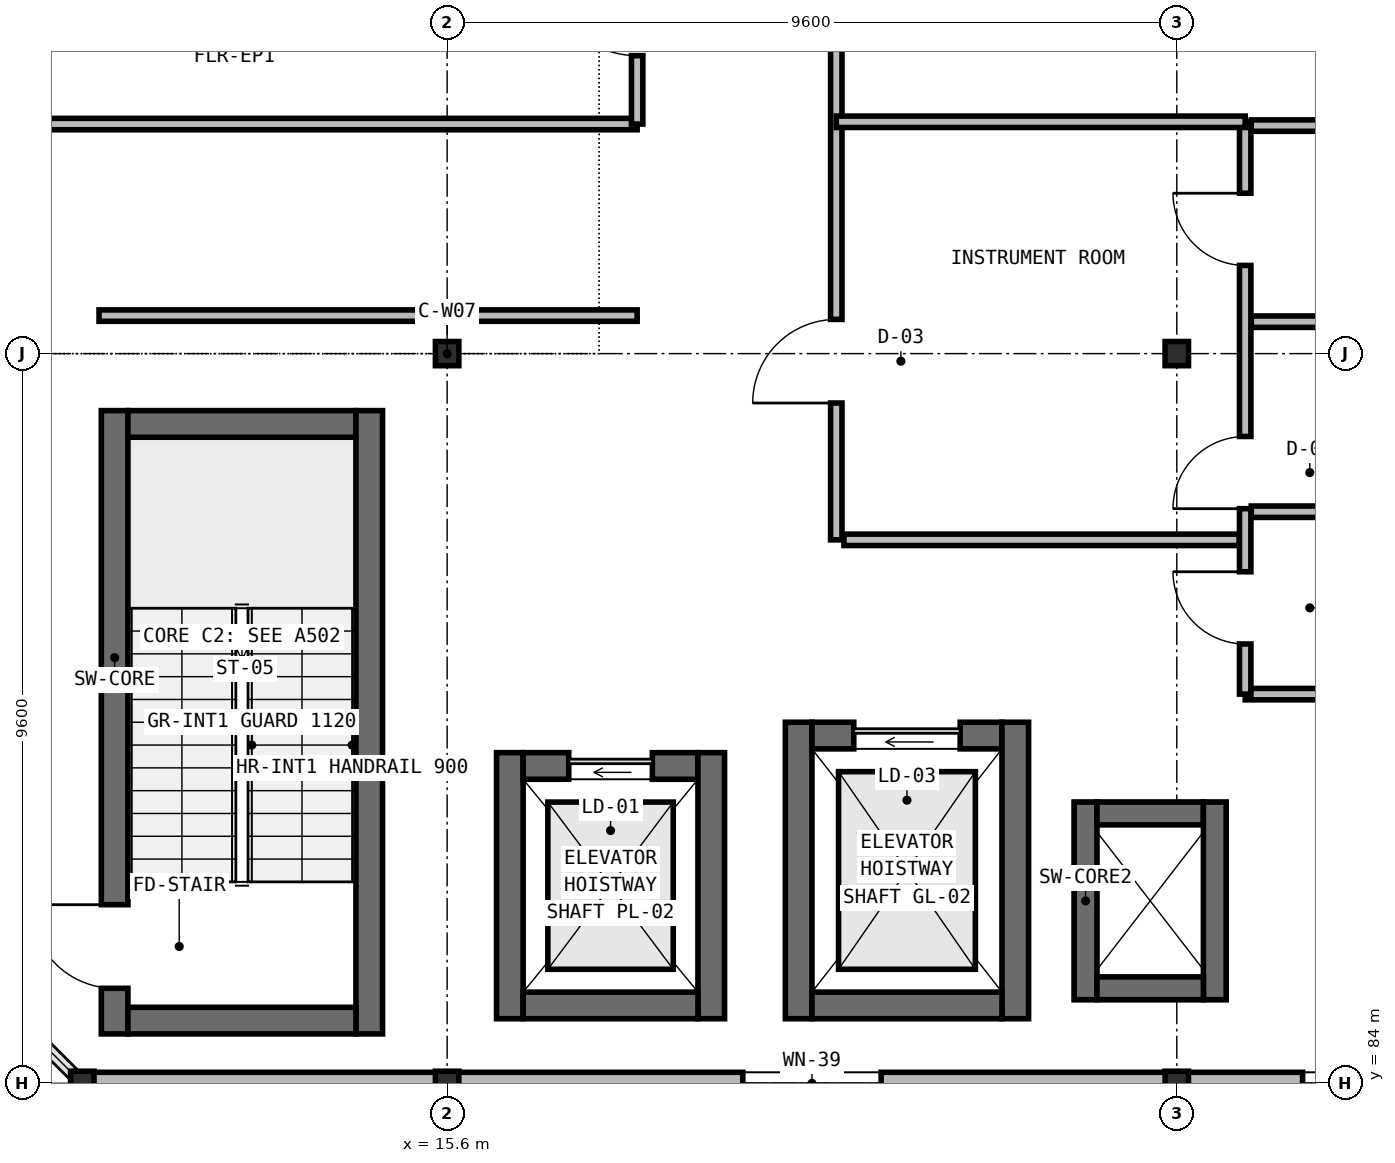
"""IFC4 building model, lengths in metres.
Left out: names, types, materials, properties, quantities, classifications, styles, units other than length and angle.
Written with IfcOpenShell. Run it as: python <this file> out.ifc"""

import sys

from ifc_helpers import new_model, si_unit, direction, frame, frame_2d, origin, origin_2d, place, context, subcontext, project, spatial, rectangle, i_section, extrude, element, fill, save


model = new_model("IFC4")
c1 = context("Model", 3, precision=1e-05, world=origin(), true_north=direction((0.0, 1.0)))
c2 = subcontext(c1, "Body", "Model", "MODEL_VIEW")
j1 = project(units=[si_unit("LENGTHUNIT", "METRE"), si_unit("PLANEANGLEUNIT", "RADIAN")], contexts=[c1])
p1 = place(None, origin())
s1 = spatial("IfcSite", under=j1, at=p1, CompositionType="ELEMENT")
p2 = place(p1, origin())
s2 = spatial("IfcBuilding", under=s1, at=p2, CompositionType="ELEMENT")
p3 = place(p2, frame((0.0, 0.0, 18.9)))
s3 = spatial("IfcBuildingStorey", under=s2, at=p3, CompositionType="ELEMENT", Elevation=18.9)
p4 = place(p3, frame((11.225, 84.65, 0.0), z_axis=(0.0, 0.0, 1.0), x_axis=(0.0, 1.0, 0.0)))
e1 = element("IfcWall", 1, at=p4, inside=s3, PredefinedType="SHEAR", context=c2, shape_type="SweptSolid", body=[
    extrude(rectangle(XDim=8.2, YDim=0.35, at=frame_2d((4.1, 0.0))), origin(), (0.0, 0.0, 1.0), 4.55),
])
p5 = place(p4, frame((0.6, 0.0, 0.0)))
e2 = element("IfcOpeningElement", 2, at=p5, cuts=e1, PredefinedType="OPENING", context=c2, shape_type="SweptSolid", body=[
    extrude(rectangle(XDim=1.1, YDim=2.15, at=frame_2d((0.55, 1.075))), frame((0.0, 0.185, 0.0), z_axis=(0.0, -1.0, 0.0), x_axis=(1.0, 0.0, 0.0)), (0.0, 0.0, 1.0), 0.37),
])
p6 = place(p3, frame((11.4, 92.675, 0.0), z_axis=(0.0, 0.0, 1.0), x_axis=(1.0, 0.0, 0.0)))
e3 = element("IfcWall", 3, at=p6, inside=s3, PredefinedType="SHEAR", context=c2, shape_type="SweptSolid", body=[
    extrude(rectangle(XDim=3.0, YDim=0.35, at=frame_2d((1.5, 0.0))), origin(), (0.0, 0.0, 1.0), 4.55),
])
p7 = place(p3, frame((14.575, 92.85, 0.0), z_axis=(0.0, 0.0, 1.0), x_axis=(0.0, -1.0, 0.0)))
e4 = element("IfcWall", 4, at=p7, inside=s3, PredefinedType="SHEAR", context=c2, shape_type="SweptSolid", body=[
    extrude(rectangle(XDim=8.2, YDim=0.35, at=frame_2d((4.1, 0.0))), origin(), (0.0, 0.0, 1.0), 4.55),
])
p8 = place(p3, frame((14.4, 84.825, 0.0), z_axis=(0.0, 0.0, 1.0), x_axis=(-1.0, 0.0, 0.0)))
e5 = element("IfcWall", 5, at=p8, inside=s3, PredefinedType="SHEAR", context=c2, shape_type="SweptSolid", body=[
    extrude(rectangle(XDim=3.0, YDim=0.35, at=frame_2d((1.5, 0.0))), origin(), (0.0, 0.0, 1.0), 4.55),
])
p9 = place(p3, frame((16.425, 84.85, 0.0), z_axis=(0.0, 0.0, 1.0), x_axis=(0.0, 1.0, 0.0)))
e6 = element("IfcWall", 6, at=p9, inside=s3, PredefinedType="SHEAR", context=c2, shape_type="SweptSolid", body=[
    extrude(rectangle(XDim=3.5, YDim=0.35, at=frame_2d((1.75, 0.0))), origin(), (0.0, 0.0, 1.0), 4.55),
])
p10 = place(p3, frame((16.6, 88.175, 0.0), z_axis=(0.0, 0.0, 1.0), x_axis=(1.0, 0.0, 0.0)))
e7 = element("IfcWall", 7, at=p10, inside=s3, PredefinedType="SHEAR", context=c2, shape_type="SweptSolid", body=[
    extrude(rectangle(XDim=2.3, YDim=0.35, at=frame_2d((1.15, 0.0))), origin(), (0.0, 0.0, 1.0), 4.55),
])
p11 = place(p10, frame((0.6, 0.0, 0.0)))
e8 = element("IfcOpeningElement", 8, at=p11, cuts=e7, PredefinedType="OPENING", context=c2, shape_type="SweptSolid", body=[
    extrude(rectangle(XDim=1.1, YDim=2.15, at=frame_2d((0.55, 1.075))), frame((0.0, 0.185, 0.0), z_axis=(0.0, -1.0, 0.0), x_axis=(1.0, 0.0, 0.0)), (0.0, 0.0, 1.0), 0.37),
])
p12 = place(p3, frame((19.075, 88.35, 0.0), z_axis=(0.0, 0.0, 1.0), x_axis=(0.0, -1.0, 0.0)))
e9 = element("IfcWall", 9, at=p12, inside=s3, PredefinedType="SHEAR", context=c2, shape_type="SweptSolid", body=[
    extrude(rectangle(XDim=3.5, YDim=0.35, at=frame_2d((1.75, 0.0))), origin(), (0.0, 0.0, 1.0), 4.55),
])
p13 = place(p3, frame((18.9, 85.025, 0.0), z_axis=(0.0, 0.0, 1.0), x_axis=(-1.0, 0.0, 0.0)))
e10 = element("IfcWall", 10, at=p13, inside=s3, PredefinedType="SHEAR", context=c2, shape_type="SweptSolid", body=[
    extrude(rectangle(XDim=2.3, YDim=0.35, at=frame_2d((1.15, 0.0))), origin(), (0.0, 0.0, 1.0), 4.55),
])
p14 = place(p3, frame((20.225, 84.85, 0.0), z_axis=(0.0, 0.0, 1.0), x_axis=(0.0, 1.0, 0.0)))
e11 = element("IfcWall", 11, at=p14, inside=s3, PredefinedType="SHEAR", context=c2, shape_type="SweptSolid", body=[
    extrude(rectangle(XDim=3.9, YDim=0.35, at=frame_2d((1.95, 0.0))), origin(), (0.0, 0.0, 1.0), 4.55),
])
p15 = place(p3, frame((20.4, 88.575, 0.0), z_axis=(0.0, 0.0, 1.0), x_axis=(1.0, 0.0, 0.0)))
e12 = element("IfcWall", 12, at=p15, inside=s3, PredefinedType="SHEAR", context=c2, shape_type="SweptSolid", body=[
    extrude(rectangle(XDim=2.5, YDim=0.35, at=frame_2d((1.25, 0.0))), origin(), (0.0, 0.0, 1.0), 4.55),
])
p16 = place(p15, frame((0.55, 0.0, 0.0)))
e13 = element("IfcOpeningElement", 13, at=p16, cuts=e12, PredefinedType="OPENING", context=c2, shape_type="SweptSolid", body=[
    extrude(rectangle(XDim=1.4, YDim=2.3, at=frame_2d((0.7, 1.15))), frame((0.0, 0.185, 0.0), z_axis=(0.0, -1.0, 0.0), x_axis=(1.0, 0.0, 0.0)), (0.0, 0.0, 1.0), 0.37),
])
p17 = place(p3, frame((23.075, 88.75, 0.0), z_axis=(0.0, 0.0, 1.0), x_axis=(0.0, -1.0, 0.0)))
e14 = element("IfcWall", 14, at=p17, inside=s3, PredefinedType="SHEAR", context=c2, shape_type="SweptSolid", body=[
    extrude(rectangle(XDim=3.9, YDim=0.35, at=frame_2d((1.95, 0.0))), origin(), (0.0, 0.0, 1.0), 4.55),
])
p18 = place(p3, frame((22.9, 85.025, 0.0), z_axis=(0.0, 0.0, 1.0), x_axis=(-1.0, 0.0, 0.0)))
e15 = element("IfcWall", 15, at=p18, inside=s3, PredefinedType="SHEAR", context=c2, shape_type="SweptSolid", body=[
    extrude(rectangle(XDim=2.5, YDim=0.35, at=frame_2d((1.25, 0.0))), origin(), (0.0, 0.0, 1.0), 4.55),
])
for number, where, z_axis, x_axis in (
    (16, (15.6, 84.0, 0.0), (0.0, 0.0, 1.0), (1.0, 0.0, 0.0)),
    (17, (15.6, 93.6, 0.0), (0.0, 0.0, 1.0), (1.0, 0.0, 0.0)),
    (18, (25.2, 84.0, 0.0), (0.0, 0.0, 1.0), (1.0, 0.0, 0.0)),
    (19, (25.2, 93.6, 0.0), (0.0, 0.0, 1.0), (1.0, 0.0, 0.0)),
    (20, (10.8, 84.0, 0.0), (0.0, 0.0, 1.0), (1.0, 0.0, 0.0)),
):
    element("IfcColumn", number, at=place(p3, frame(where, z_axis=z_axis, x_axis=x_axis)), inside=s3, PredefinedType="COLUMN", context=c2, shape_type="SweptSolid", body=[
        extrude(i_section(OverallWidth=0.308, OverallDepth=0.318, WebThickness=0.013, FlangeThickness=0.021, at=origin_2d()), origin(), (0.0, 0.0, 1.0), 4.55),
    ])
p19 = place(p3, frame((24.0, 85.1, 0.0), z_axis=(0.0, 0.0, 1.0), x_axis=(0.0, 1.0, 0.0)))
e21 = element("IfcWall", 21, at=p19, inside=s3, PredefinedType="SHEAR", context=c2, shape_type="SweptSolid", body=[
    extrude(rectangle(XDim=2.6, YDim=0.3, at=frame_2d((1.3, 0.0))), origin(), (0.0, 0.0, 1.0), 4.37),
])
p20 = place(p3, frame((24.15, 87.55, 0.0), z_axis=(0.0, 0.0, 1.0), x_axis=(1.0, 0.0, 0.0)))
e22 = element("IfcWall", 22, at=p20, inside=s3, PredefinedType="SHEAR", context=c2, shape_type="SweptSolid", body=[
    extrude(rectangle(XDim=1.4, YDim=0.3, at=frame_2d((0.7, 0.0))), origin(), (0.0, 0.0, 1.0), 4.37),
])
p21 = place(p3, frame((25.7, 87.7, 0.0), z_axis=(0.0, 0.0, 1.0), x_axis=(0.0, -1.0, 0.0)))
e23 = element("IfcWall", 23, at=p21, inside=s3, PredefinedType="SHEAR", context=c2, shape_type="SweptSolid", body=[
    extrude(rectangle(XDim=2.6, YDim=0.3, at=frame_2d((1.3, 0.0))), origin(), (0.0, 0.0, 1.0), 4.37),
])
p22 = place(p3, frame((25.55, 85.25, 0.0), z_axis=(0.0, 0.0, 1.0), x_axis=(-1.0, 0.0, 0.0)))
e24 = element("IfcWall", 24, at=p22, inside=s3, PredefinedType="SHEAR", context=c2, shape_type="SweptSolid", body=[
    extrude(rectangle(XDim=1.4, YDim=0.3, at=frame_2d((0.7, 0.0))), origin(), (0.0, 0.0, 1.0), 4.37),
])
p23 = place(p3, frame((29.996, 84.0, 0.0), z_axis=(0.0, 0.0, 1.0), x_axis=(-1.0, 0.0, 0.0)))
e25 = element("IfcWall", 25, at=p23, inside=s3, PredefinedType="SOLIDWALL", context=c2, shape_type="SweptSolid", body=[
    extrude(rectangle(XDim=4.792, YDim=0.29, at=frame_2d((2.396, 0.0))), origin(), (0.0, 0.0, 1.0), 4.37),
])
p24 = place(p23, frame((1.651, 0.0, 0.95)))
e26 = element("IfcOpeningElement", 26, at=p24, cuts=e25, PredefinedType="OPENING", context=c2, shape_type="SweptSolid", body=[
    extrude(rectangle(XDim=1.49, YDim=1.59, at=frame_2d((0.745, 0.795))), frame((0.0, 0.155, 0.0), z_axis=(0.0, -1.0, 0.0), x_axis=(1.0, 0.0, 0.0)), (0.0, 0.0, 1.0), 0.31),
])
p25 = place(p3, frame((25.196, 84.0, 0.0), z_axis=(0.0, 0.0, 1.0), x_axis=(-1.0, 0.0, 0.0)))
e27 = element("IfcWall", 27, at=p25, inside=s3, PredefinedType="SOLIDWALL", context=c2, shape_type="SweptSolid", body=[
    extrude(rectangle(XDim=9.592, YDim=0.29, at=frame_2d((4.796, 0.0))), origin(), (0.0, 0.0, 1.0), 3.884),
])
p26 = place(p25, frame((3.886, 0.0, 0.95)))
e28 = element("IfcOpeningElement", 28, at=p26, cuts=e27, PredefinedType="OPENING", context=c2, shape_type="SweptSolid", body=[
    extrude(rectangle(XDim=1.82, YDim=1.51, at=frame_2d((0.91, 0.755))), frame((0.0, 0.155, 0.0), z_axis=(0.0, -1.0, 0.0), x_axis=(1.0, 0.0, 0.0)), (0.0, 0.0, 1.0), 0.31),
])
p27 = place(p3, frame((15.596, 84.0, 0.0), z_axis=(0.0, 0.0, 1.0), x_axis=(-1.0, 0.0, 0.0)))
e29 = element("IfcWall", 29, at=p27, inside=s3, PredefinedType="SOLIDWALL", context=c2, shape_type="SweptSolid", body=[
    extrude(rectangle(XDim=4.792, YDim=0.29, at=frame_2d((2.396, 0.0))), origin(), (0.0, 0.0, 1.0), 4.37),
])
p28 = place(p3, frame((26.18, 91.52, 0.0), z_axis=(0.0, 0.0, 1.0), x_axis=(1.0, 0.0, 0.0)))
e30 = element("IfcWall", 30, at=p28, inside=s3, PredefinedType="PARTITIONING", context=c2, shape_type="SweptSolid", body=[
    extrude(rectangle(XDim=8.46, YDim=0.15, at=frame_2d((4.23, 0.0))), origin(), (0.0, 0.0, 1.0), 4.3),
])
for number, where, z_axis, x_axis in (
    (31, (26.18, 94.02, 0.0), (0.0, 0.0, 1.0), (1.0, 0.0, 0.0)),
    (32, (26.18, 96.6, 0.0), (0.0, 0.0, 1.0), (1.0, 0.0, 0.0)),
):
    element("IfcWall", number, at=place(p3, frame(where, z_axis=z_axis, x_axis=x_axis)), inside=s3, PredefinedType="PARTITIONING", context=c2, shape_type="SweptSolid", body=[
        extrude(rectangle(XDim=8.56, YDim=0.15, at=frame_2d((4.28, 0.0))), origin(), (0.0, 0.0, 1.0), 4.3),
    ])
p29 = place(p3, frame((26.1, 89.12, 0.0), z_axis=(0.0, 0.0, 1.0), x_axis=(1.0, 0.0, 0.0)))
e33 = element("IfcWall", 33, at=p29, inside=s3, PredefinedType="PARTITIONING", context=c2, shape_type="SweptSolid", body=[
    extrude(rectangle(XDim=8.54, YDim=0.15, at=frame_2d((4.27, 0.0))), origin(), (0.0, 0.0, 1.0), 4.3),
])
p30 = place(p3, frame((26.1, 89.12, 0.0), z_axis=(0.0, 0.0, 1.0), x_axis=(0.0, 1.0, 0.0)))
e34 = element("IfcWall", 34, at=p30, inside=s3, PredefinedType="PARTITIONING", context=c2, shape_type="SweptSolid", body=[
    extrude(rectangle(XDim=7.53, YDim=0.15, at=frame_2d((3.765, 0.0))), origin(), (0.0, 0.0, 1.0), 4.3),
])
p31 = place(p30, frame((0.66, 0.0, 0.0)))
e35 = element("IfcOpeningElement", 35, at=p31, cuts=e34, PredefinedType="OPENING", context=c2, shape_type="SweptSolid", body=[
    extrude(rectangle(XDim=0.95, YDim=2.1, at=frame_2d((0.475, 1.05))), frame((0.0, 0.085, 0.0), z_axis=(0.0, -1.0, 0.0), x_axis=(1.0, 0.0, 0.0)), (0.0, 0.0, 1.0), 0.17),
])
p32 = place(p30, frame((2.44, 0.0, 0.0)))
e36 = element("IfcOpeningElement", 36, at=p32, cuts=e34, PredefinedType="OPENING", context=c2, shape_type="SweptSolid", body=[
    extrude(rectangle(XDim=0.95, YDim=2.1, at=frame_2d((0.475, 1.05))), frame((0.0, 0.085, 0.0), z_axis=(0.0, -1.0, 0.0), x_axis=(1.0, 0.0, 0.0)), (0.0, 0.0, 1.0), 0.17),
])
p33 = place(p30, frame((5.64, 0.0, 0.0)))
e37 = element("IfcOpeningElement", 37, at=p33, cuts=e34, PredefinedType="OPENING", context=c2, shape_type="SweptSolid", body=[
    extrude(rectangle(XDim=0.95, YDim=2.1, at=frame_2d((0.475, 1.05))), frame((0.0, 0.085, 0.0), z_axis=(0.0, -1.0, 0.0), x_axis=(1.0, 0.0, 0.0)), (0.0, 0.0, 1.0), 0.17),
])
p34 = place(p3, frame((6.16, 96.62, 0.0), z_axis=(0.0, 0.0, 1.0), x_axis=(1.0, 0.0, 0.0)))
e38 = element("IfcWall", 38, at=p34, inside=s3, PredefinedType="PARTITIONING", context=c2, shape_type="SweptSolid", body=[
    extrude(rectangle(XDim=11.94, YDim=0.15, at=frame_2d((5.97, 0.0))), origin(), (0.0, 0.0, 1.0), 4.3),
])
p35 = place(p3, frame((11.02, 94.1, 0.0), z_axis=(0.0, 0.0, 1.0), x_axis=(1.0, 0.0, 0.0)))
e39 = element("IfcWall", 39, at=p35, inside=s3, PredefinedType="PARTITIONING", context=c2, shape_type="SweptSolid", body=[
    extrude(rectangle(XDim=7.08, YDim=0.15, at=frame_2d((3.54, 0.0))), origin(), (0.0, 0.0, 1.0), 4.3),
])
p36 = place(p3, frame((18.1, 96.62, 0.0), z_axis=(0.0, 0.0, 1.0), x_axis=(0.0, 1.0, 0.0)))
e40 = element("IfcWall", 40, at=p36, inside=s3, PredefinedType="PARTITIONING", context=c2, shape_type="SweptSolid", body=[
    extrude(rectangle(XDim=20.82, YDim=0.15, at=frame_2d((10.41, 0.0))), origin(), (0.0, 0.0, 1.0), 4.3),
])
p37 = place(p36, frame((0.9, 0.0, 0.0)))
e41 = element("IfcOpeningElement", 41, at=p37, cuts=e40, PredefinedType="OPENING", context=c2, shape_type="SweptSolid", body=[
    extrude(rectangle(XDim=1.2, YDim=2.2, at=frame_2d((0.6, 1.1))), frame((0.0, 0.085, 0.0), z_axis=(0.0, -1.0, 0.0), x_axis=(1.0, 0.0, 0.0)), (0.0, 0.0, 1.0), 0.17),
])
p38 = place(p36, frame((4.2, 0.0, 0.0)))
e42 = element("IfcOpeningElement", 42, at=p38, cuts=e40, PredefinedType="OPENING", context=c2, shape_type="SweptSolid", body=[
    extrude(rectangle(XDim=1.2, YDim=2.2, at=frame_2d((0.6, 1.1))), frame((0.0, 0.085, 0.0), z_axis=(0.0, -1.0, 0.0), x_axis=(1.0, 0.0, 0.0)), (0.0, 0.0, 1.0), 0.17),
])
p39 = place(p36, frame((9.4, 0.0, 0.0)))
e43 = element("IfcOpeningElement", 43, at=p39, cuts=e40, PredefinedType="OPENING", context=c2, shape_type="SweptSolid", body=[
    extrude(rectangle(XDim=1.0, YDim=2.2, at=frame_2d((0.5, 1.1))), frame((0.0, 0.085, 0.0), z_axis=(0.0, -1.0, 0.0), x_axis=(1.0, 0.0, 0.0)), (0.0, 0.0, 1.0), 0.17),
])
p40 = place(p3, frame((20.72, 91.15, 0.0), z_axis=(0.0, 0.0, 1.0), x_axis=(0.0, 1.0, 0.0)))
e44 = element("IfcWall", 44, at=p40, inside=s3, PredefinedType="PARTITIONING", context=c2, shape_type="SweptSolid", body=[
    extrude(rectangle(XDim=12.8, YDim=0.15, at=frame_2d((6.4, 0.0))), origin(), (0.0, 0.0, 1.0), 4.3),
])
p41 = place(p40, frame((1.8, 0.0, 0.0)))
e45 = element("IfcOpeningElement", 45, at=p41, cuts=e44, PredefinedType="OPENING", context=c2, shape_type="SweptSolid", body=[
    extrude(rectangle(XDim=1.1, YDim=2.2, at=frame_2d((0.55, 1.1))), frame((0.0, 0.085, 0.0), z_axis=(0.0, -1.0, 0.0), x_axis=(1.0, 0.0, 0.0)), (0.0, 0.0, 1.0), 0.17),
])
p42 = place(p40, frame((6.8, 0.0, 0.0)))
e46 = element("IfcOpeningElement", 46, at=p42, cuts=e44, PredefinedType="OPENING", context=c2, shape_type="SweptSolid", body=[
    extrude(rectangle(XDim=1.2, YDim=2.2, at=frame_2d((0.6, 1.1))), frame((0.0, 0.085, 0.0), z_axis=(0.0, -1.0, 0.0), x_axis=(1.0, 0.0, 0.0)), (0.0, 0.0, 1.0), 0.17),
])
p43 = place(p3, frame((20.82, 91.15, 0.0), z_axis=(0.0, 0.0, 1.0), x_axis=(1.0, 0.0, 0.0)))
e47 = element("IfcWall", 47, at=p43, inside=s3, PredefinedType="PARTITIONING", context=c2, shape_type="SweptSolid", body=[
    extrude(rectangle(XDim=5.2, YDim=0.15, at=frame_2d((2.6, 0.0))), origin(), (0.0, 0.0, 1.0), 4.3),
])
p44 = place(p3, frame((20.72, 96.65, 0.0), z_axis=(0.0, 0.0, 1.0), x_axis=(1.0, 0.0, 0.0)))
e48 = element("IfcWall", 48, at=p44, inside=s3, PredefinedType="PARTITIONING", context=c2, shape_type="SweptSolid", body=[
    extrude(rectangle(XDim=5.38, YDim=0.15, at=frame_2d((2.69, 0.0))), origin(), (0.0, 0.0, 1.0), 4.3),
])
p45 = place(p24, origin())
e49 = element("IfcWindow", 49, at=p45, inside=s3, PartitioningType="SINGLE_PANEL", PredefinedType="WINDOW", context=c2, shape_type="SweptSolid", body=[
    extrude(rectangle(XDim=1.49, YDim=1.59, at=frame_2d((0.745, 0.795))), frame((0.0, 0.03, 0.0), z_axis=(0.0, -1.0, 0.0), x_axis=(1.0, 0.0, 0.0)), (0.0, 0.0, 1.0), 0.06),
])
fill(e26, e49)
p46 = place(p26, origin())
e50 = element("IfcWindow", 50, at=p46, inside=s3, PartitioningType="SINGLE_PANEL", PredefinedType="WINDOW", context=c2, shape_type="SweptSolid", body=[
    extrude(rectangle(XDim=1.82, YDim=1.51, at=frame_2d((0.91, 0.755))), frame((0.0, 0.03, 0.0), z_axis=(0.0, -1.0, 0.0), x_axis=(1.0, 0.0, 0.0)), (0.0, 0.0, 1.0), 0.06),
])
fill(e28, e50)
p47 = place(p5, origin())
e51 = element("IfcDoor", 51, at=p47, inside=s3, OperationType="SINGLE_SWING_RIGHT", PredefinedType="DOOR", context=c2, shape_type="SweptSolid", body=[
    extrude(rectangle(XDim=1.1, YDim=2.15, at=frame_2d((0.55, 1.075))), frame((0.0, 0.025, 0.0), z_axis=(0.0, -1.0, 0.0), x_axis=(1.0, 0.0, 0.0)), (0.0, 0.0, 1.0), 0.05),
])
fill(e2, e51)
p48 = place(p11, origin())
e52 = element("IfcDoor", 52, at=p48, inside=s3, OperationType="SLIDING_TO_LEFT", PredefinedType="USERDEFINED", context=c2, shape_type="SweptSolid", body=[
    extrude(rectangle(XDim=1.1, YDim=2.15, at=frame_2d((0.55, 1.075))), frame((0.0, 0.025, 0.0), z_axis=(0.0, -1.0, 0.0), x_axis=(1.0, 0.0, 0.0)), (0.0, 0.0, 1.0), 0.05),
])
fill(e8, e52)
p49 = place(p16, origin())
e53 = element("IfcDoor", 53, at=p49, inside=s3, OperationType="SLIDING_TO_LEFT", PredefinedType="USERDEFINED", context=c2, shape_type="SweptSolid", body=[
    extrude(rectangle(XDim=1.4, YDim=2.3, at=frame_2d((0.7, 1.15))), frame((0.0, 0.025, 0.0), z_axis=(0.0, -1.0, 0.0), x_axis=(1.0, 0.0, 0.0)), (0.0, 0.0, 1.0), 0.05),
])
fill(e13, e53)
p50 = place(p31, origin())
e54 = element("IfcDoor", 54, at=p50, inside=s3, OperationType="SINGLE_SWING_RIGHT", PredefinedType="DOOR", context=c2, shape_type="SweptSolid", body=[
    extrude(rectangle(XDim=0.95, YDim=2.1, at=frame_2d((0.475, 1.05))), frame((0.0, 0.025, 0.0), z_axis=(0.0, -1.0, 0.0), x_axis=(1.0, 0.0, 0.0)), (0.0, 0.0, 1.0), 0.05),
])
fill(e35, e54)
p51 = place(p32, origin())
e55 = element("IfcDoor", 55, at=p51, inside=s3, OperationType="SINGLE_SWING_LEFT", PredefinedType="DOOR", context=c2, shape_type="SweptSolid", body=[
    extrude(rectangle(XDim=0.95, YDim=2.1, at=frame_2d((0.475, 1.05))), frame((0.0, 0.025, 0.0), z_axis=(0.0, -1.0, 0.0), x_axis=(1.0, 0.0, 0.0)), (0.0, 0.0, 1.0), 0.05),
])
fill(e36, e55)
p52 = place(p33, origin())
e56 = element("IfcDoor", 56, at=p52, inside=s3, OperationType="SINGLE_SWING_RIGHT", PredefinedType="DOOR", context=c2, shape_type="SweptSolid", body=[
    extrude(rectangle(XDim=0.95, YDim=2.1, at=frame_2d((0.475, 1.05))), frame((0.0, 0.025, 0.0), z_axis=(0.0, -1.0, 0.0), x_axis=(1.0, 0.0, 0.0)), (0.0, 0.0, 1.0), 0.05),
])
fill(e37, e56)
p53 = place(p37, origin())
e57 = element("IfcDoor", 57, at=p53, inside=s3, OperationType="SINGLE_SWING_RIGHT", PredefinedType="DOOR", context=c2, shape_type="SweptSolid", body=[
    extrude(rectangle(XDim=1.2, YDim=2.2, at=frame_2d((0.6, 1.1))), frame((0.0, 0.025, 0.0), z_axis=(0.0, -1.0, 0.0), x_axis=(1.0, 0.0, 0.0)), (0.0, 0.0, 1.0), 0.05),
])
fill(e41, e57)
p54 = place(p41, origin())
e58 = element("IfcDoor", 58, at=p54, inside=s3, OperationType="SINGLE_SWING_LEFT", PredefinedType="DOOR", context=c2, shape_type="SweptSolid", body=[
    extrude(rectangle(XDim=1.1, YDim=2.2, at=frame_2d((0.55, 1.1))), frame((0.0, 0.025, 0.0), z_axis=(0.0, -1.0, 0.0), x_axis=(1.0, 0.0, 0.0)), (0.0, 0.0, 1.0), 0.05),
])
fill(e45, e58)
save(model, sys.argv[1])
